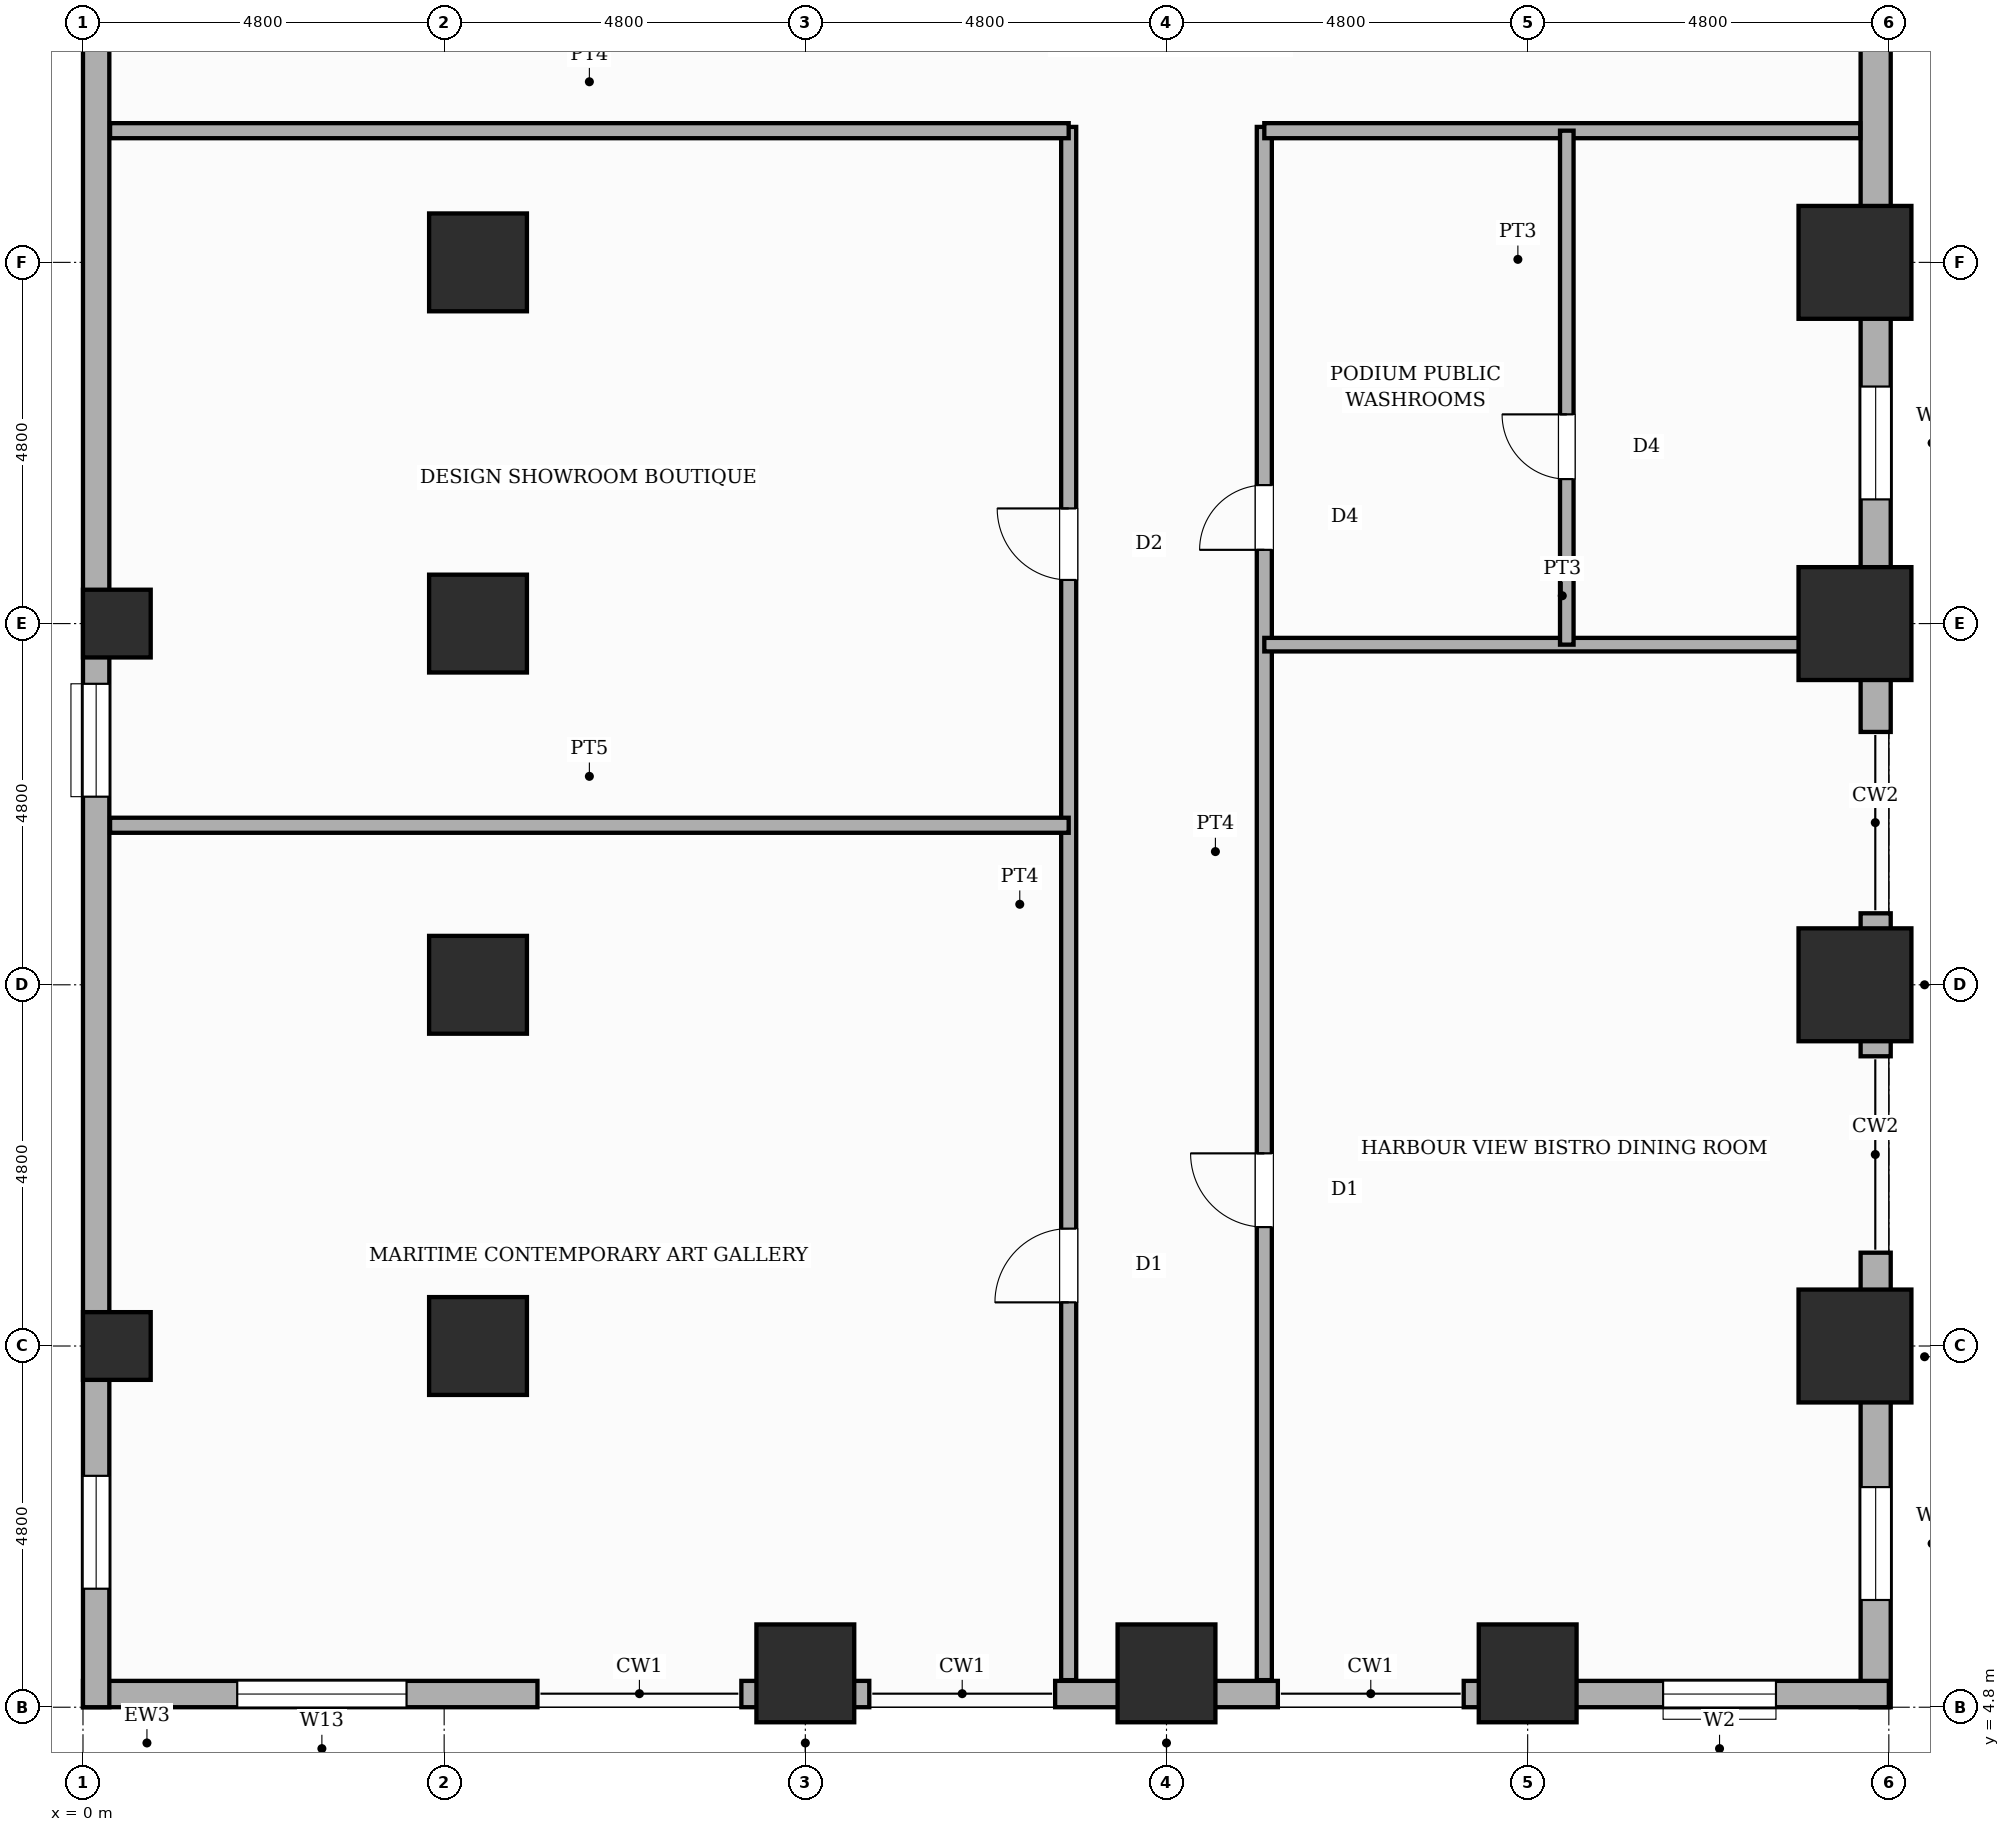
"""IFC4 building model, lengths in metres.
Left out: names, types, materials, properties, quantities, classifications, styles, units other than length and angle.
Written with IfcOpenShell. Run it as: python <this file> out.ifc"""

import sys

from ifc_helpers import new_model, si_unit, direction, frame, frame_2d, origin, origin_2d, place, context, subcontext, project, spatial, rectangle, circle, extrude, element, fill, save


model = new_model("IFC4")
c1 = context("Model", 3, precision=1e-05, world=origin(), true_north=direction((0.0, 1.0)))
c2 = subcontext(c1, "Body", "Model", "MODEL_VIEW")
j1 = project(units=[si_unit("LENGTHUNIT", "METRE"), si_unit("PLANEANGLEUNIT", "RADIAN")], contexts=[c1])
p1 = place(None, origin())
s1 = spatial("IfcSite", under=j1, at=p1, CompositionType="ELEMENT")
p2 = place(p1, origin())
s2 = spatial("IfcBuilding", under=s1, at=p2, CompositionType="ELEMENT")
p3 = place(p2, frame((0.0, 0.0, 10.0)))
s3 = spatial("IfcBuildingStorey", under=s2, at=p3, CompositionType="ELEMENT", Elevation=10.0)
for number, where, z_axis, x_axis in (
    (1, (0.45, 9.6, 0.0), (0.0, 0.0, 1.0), (1.0, 0.0, 0.0)),
    (2, (0.45, 19.2, 0.0), (0.0, 0.0, 1.0), (1.0, 0.0, 0.0)),
):
    element("IfcColumn", number, at=place(p3, frame(where, z_axis=z_axis, x_axis=x_axis)), inside=s3, PredefinedType="COLUMN", context=c2, shape_type="SweptSolid", body=[
        extrude(circle(Radius=0.45, at=origin_2d()), origin(), (0.0, 0.0, 1.0), 4.8),
    ])
for number, where, z_axis, x_axis in (
    (3, (5.25, 9.6, 0.0), (0.0, 0.0, 1.0), (1.0, 0.0, 0.0)),
    (4, (5.25, 14.4, 0.0), (0.0, 0.0, 1.0), (1.0, 0.0, 0.0)),
    (5, (5.25, 19.2, 0.0), (0.0, 0.0, 1.0), (1.0, 0.0, 0.0)),
    (6, (5.25, 24.0, 0.0), (0.0, 0.0, 1.0), (1.0, 0.0, 0.0)),
    (7, (9.6, 5.25, 0.0), (0.0, 0.0, 1.0), (1.0, 0.0, 0.0)),
    (8, (14.4, 5.25, 0.0), (0.0, 0.0, 1.0), (1.0, 0.0, 0.0)),
    (9, (19.2, 5.25, 0.0), (0.0, 0.0, 1.0), (1.0, 0.0, 0.0)),
):
    element("IfcColumn", number, at=place(p3, frame(where, z_axis=z_axis, x_axis=x_axis)), inside=s3, PredefinedType="COLUMN", context=c2, shape_type="SweptSolid", body=[
        extrude(rectangle(XDim=1.3, YDim=1.3, at=origin_2d()), origin(), (0.0, 0.0, 1.0), 4.8),
    ])
for number, where, z_axis, x_axis in (
    (10, (23.55, 9.6, 0.0), (0.0, 0.0, 1.0), (1.0, 0.0, 0.0)),
    (11, (23.55, 14.4, 0.0), (0.0, 0.0, 1.0), (1.0, 0.0, 0.0)),
    (12, (23.55, 19.2, 0.0), (0.0, 0.0, 1.0), (1.0, 0.0, 0.0)),
    (13, (23.55, 24.0, 0.0), (0.0, 0.0, 1.0), (1.0, 0.0, 0.0)),
):
    element("IfcColumn", number, at=place(p3, frame(where, z_axis=z_axis, x_axis=x_axis)), inside=s3, PredefinedType="USERDEFINED", context=c2, shape_type="SweptSolid", body=[
        extrude(rectangle(XDim=1.5, YDim=1.5, at=origin_2d()), origin(), (0.0, 0.0, 1.0), 4.8),
    ])
p4 = place(p3, frame((23.825, 48.0, 0.0), z_axis=(0.0, 0.0, 1.0), x_axis=(0.0, -1.0, 0.0)))
e14 = element("IfcWall", 14, at=p4, inside=s3, PredefinedType="SOLIDWALL", context=c2, shape_type="SweptSolid", body=[
    extrude(rectangle(XDim=30.24, YDim=0.4, at=frame_2d((15.12, 0.0))), origin(), (0.0, 0.0, 1.0), 3.48),
])
p5 = place(p4, frame((25.65, 0.0, 0.85)))
e15 = element("IfcOpeningElement", 15, at=p5, cuts=e14, PredefinedType="OPENING", context=c2, shape_type="SweptSolid", body=[
    extrude(rectangle(XDim=1.5, YDim=2.1, at=frame_2d((0.75, 1.05))), frame((0.0, 0.21, 0.0), z_axis=(0.0, -1.0, 0.0), x_axis=(1.0, 0.0, 0.0)), (0.0, 0.0, 1.0), 0.42),
])
p6 = place(p3, frame((23.825, 15.35, 0.0), z_axis=(0.0, 0.0, 1.0), x_axis=(0.0, -1.0, 0.0)))
e16 = element("IfcWall", 16, at=p6, inside=s3, PredefinedType="SOLIDWALL", context=c2, shape_type="SweptSolid", body=[
    extrude(rectangle(XDim=1.9, YDim=0.4, at=frame_2d((0.95, 0.0))), origin(), (0.0, 0.0, 1.0), 3.48),
])
p7 = place(p3, frame((23.825, 10.84, 0.0), z_axis=(0.0, 0.0, 1.0), x_axis=(0.0, -1.0, 0.0)))
e17 = element("IfcWall", 17, at=p7, inside=s3, PredefinedType="SOLIDWALL", context=c2, shape_type="SweptSolid", body=[
    extrude(rectangle(XDim=6.04, YDim=0.4, at=frame_2d((3.02, 0.0))), origin(), (0.0, 0.0, 1.0), 3.48),
])
p8 = place(p7, frame((3.115, 0.0, 0.85)))
e18 = element("IfcOpeningElement", 18, at=p8, cuts=e17, PredefinedType="OPENING", context=c2, shape_type="SweptSolid", body=[
    extrude(rectangle(XDim=1.5, YDim=2.1, at=frame_2d((0.75, 1.05))), frame((0.0, 0.21, 0.0), z_axis=(0.0, -1.0, 0.0), x_axis=(1.0, 0.0, 0.0)), (0.0, 0.0, 1.0), 0.42),
])
p9 = place(p3, frame((24.0, 4.975, 0.0), z_axis=(0.0, 0.0, 1.0), x_axis=(-1.0, 0.0, 0.0)))
e19 = element("IfcWall", 19, at=p9, inside=s3, PredefinedType="STANDARD", context=c2, shape_type="SweptSolid", body=[
    extrude(rectangle(XDim=5.65, YDim=0.35, at=frame_2d((2.825, 0.0))), origin(), (0.0, 0.0, 1.0), 3.48),
])
p10 = place(p9, frame((1.5, 0.0, 0.85)))
e20 = element("IfcOpeningElement", 20, at=p10, cuts=e19, PredefinedType="OPENING", context=c2, shape_type="SweptSolid", body=[
    extrude(rectangle(XDim=1.5, YDim=2.1, at=frame_2d((0.75, 1.05))), frame((0.0, 0.185, 0.0), z_axis=(0.0, -1.0, 0.0), x_axis=(1.0, 0.0, 0.0)), (0.0, 0.0, 1.0), 0.37),
])
p11 = place(p3, frame((15.88, 4.975, 0.0), z_axis=(0.0, 0.0, 1.0), x_axis=(-1.0, 0.0, 0.0)))
e21 = element("IfcWall", 21, at=p11, inside=s3, PredefinedType="STANDARD", context=c2, shape_type="SweptSolid", body=[
    extrude(rectangle(XDim=2.96, YDim=0.35, at=frame_2d((1.48, 0.0))), origin(), (0.0, 0.0, 1.0), 3.48),
])
p12 = place(p3, frame((10.45, 4.975, 0.0), z_axis=(0.0, 0.0, 1.0), x_axis=(-1.0, 0.0, 0.0)))
e22 = element("IfcWall", 22, at=p12, inside=s3, PredefinedType="STANDARD", context=c2, shape_type="SweptSolid", body=[
    extrude(rectangle(XDim=1.7, YDim=0.35, at=frame_2d((0.85, 0.0))), origin(), (0.0, 0.0, 1.0), 3.48),
])
p13 = place(p3, frame((6.04, 4.975, 0.0), z_axis=(0.0, 0.0, 1.0), x_axis=(-1.0, 0.0, 0.0)))
e23 = element("IfcWall", 23, at=p13, inside=s3, PredefinedType="STANDARD", context=c2, shape_type="SweptSolid", body=[
    extrude(rectangle(XDim=6.04, YDim=0.35, at=frame_2d((3.02, 0.0))), origin(), (0.0, 0.0, 1.0), 4.4),
])
p14 = place(p13, frame((1.74, 0.0, 0.85)))
e24 = element("IfcOpeningElement", 24, at=p14, cuts=e23, PredefinedType="OPENING", context=c2, shape_type="SweptSolid", body=[
    extrude(rectangle(XDim=2.25, YDim=2.85, at=frame_2d((1.125, 1.425))), frame((0.0, 0.185, 0.0), z_axis=(0.0, -1.0, 0.0), x_axis=(1.0, 0.0, 0.0)), (0.0, 0.0, 1.0), 0.37),
])
p15 = place(p3, frame((0.175, 4.8, 0.0), z_axis=(0.0, 0.0, 1.0), x_axis=(0.0, 1.0, 0.0)))
e25 = element("IfcWall", 25, at=p15, inside=s3, PredefinedType="STANDARD", context=c2, shape_type="SweptSolid", body=[
    extrude(rectangle(XDim=43.2, YDim=0.35, at=frame_2d((21.6, 0.0))), origin(), (0.0, 0.0, 1.0), 3.48),
])
p16 = place(p15, frame((1.575, 0.0, 0.85)))
e26 = element("IfcOpeningElement", 26, at=p16, cuts=e25, PredefinedType="OPENING", context=c2, shape_type="SweptSolid", body=[
    extrude(rectangle(XDim=1.5, YDim=2.1, at=frame_2d((0.75, 1.05))), frame((0.0, 0.185, 0.0), z_axis=(0.0, -1.0, 0.0), x_axis=(1.0, 0.0, 0.0)), (0.0, 0.0, 1.0), 0.37),
])
p17 = place(p15, frame((12.1, 0.0, 0.85)))
e27 = element("IfcOpeningElement", 27, at=p17, cuts=e25, PredefinedType="OPENING", context=c2, shape_type="SweptSolid", body=[
    extrude(rectangle(XDim=1.5, YDim=2.1, at=frame_2d((0.75, 1.05))), frame((0.0, 0.185, 0.0), z_axis=(0.0, -1.0, 0.0), x_axis=(1.0, 0.0, 0.0)), (0.0, 0.0, 1.0), 0.37),
])
p18 = place(p3, frame((13.1, 5.16, 0.0), z_axis=(0.0, 0.0, 1.0), x_axis=(0.0, 1.0, 0.0)))
e28 = element("IfcWall", 28, at=p18, inside=s3, PredefinedType="PARTITIONING", context=c2, shape_type="SweptSolid", body=[
    extrude(rectangle(XDim=20.64, YDim=0.2, at=frame_2d((10.32, 0.0))), origin(), (0.0, 0.0, 1.0), 4.4),
])
p19 = place(p18, frame((5.02, 0.0, 0.0)))
e29 = element("IfcOpeningElement", 29, at=p19, cuts=e28, PredefinedType="OPENING", context=c2, shape_type="SweptSolid", body=[
    extrude(rectangle(XDim=0.98, YDim=2.18, at=frame_2d((0.49, 1.09))), frame((0.0, 0.11, 0.0), z_axis=(0.0, -1.0, 0.0), x_axis=(1.0, 0.0, 0.0)), (0.0, 0.0, 1.0), 0.22),
])
p20 = place(p18, frame((14.62, 0.0, 0.0)))
e30 = element("IfcOpeningElement", 30, at=p20, cuts=e28, PredefinedType="OPENING", context=c2, shape_type="SweptSolid", body=[
    extrude(rectangle(XDim=0.95, YDim=2.15, at=frame_2d((0.475, 1.075))), frame((0.0, 0.11, 0.0), z_axis=(0.0, -1.0, 0.0), x_axis=(1.0, 0.0, 0.0)), (0.0, 0.0, 1.0), 0.22),
])
p21 = place(p3, frame((15.7, 5.16, 0.0), z_axis=(0.0, 0.0, 1.0), x_axis=(0.0, 1.0, 0.0)))
e31 = element("IfcWall", 31, at=p21, inside=s3, PredefinedType="PARTITIONING", context=c2, shape_type="SweptSolid", body=[
    extrude(rectangle(XDim=20.64, YDim=0.2, at=frame_2d((10.32, 0.0))), origin(), (0.0, 0.0, 1.0), 4.4),
])
p22 = place(p21, frame((6.02, 0.0, 0.0)))
e32 = element("IfcOpeningElement", 32, at=p22, cuts=e31, PredefinedType="OPENING", context=c2, shape_type="SweptSolid", body=[
    extrude(rectangle(XDim=0.98, YDim=2.18, at=frame_2d((0.49, 1.09))), frame((0.0, 0.11, 0.0), z_axis=(0.0, -1.0, 0.0), x_axis=(1.0, 0.0, 0.0)), (0.0, 0.0, 1.0), 0.22),
])
p23 = place(p21, frame((15.02, 0.0, 0.0)))
e33 = element("IfcOpeningElement", 33, at=p23, cuts=e31, PredefinedType="OPENING", context=c2, shape_type="SweptSolid", body=[
    extrude(rectangle(XDim=0.86, YDim=2.1, at=frame_2d((0.43, 1.05))), frame((0.0, 0.11, 0.0), z_axis=(0.0, -1.0, 0.0), x_axis=(1.0, 0.0, 0.0)), (0.0, 0.0, 1.0), 0.22),
])
p24 = place(p3, frame((0.36, 25.75, 0.0), z_axis=(0.0, 0.0, 1.0), x_axis=(1.0, 0.0, 0.0)))
e34 = element("IfcWall", 34, at=p24, inside=s3, PredefinedType="PARTITIONING", context=c2, shape_type="SweptSolid", body=[
    extrude(rectangle(XDim=12.74, YDim=0.2, at=frame_2d((6.37, 0.0))), origin(), (0.0, 0.0, 1.0), 4.4),
])
p25 = place(p3, frame((15.7, 25.75, 0.0), z_axis=(0.0, 0.0, 1.0), x_axis=(1.0, 0.0, 0.0)))
e35 = element("IfcWall", 35, at=p25, inside=s3, PredefinedType="PARTITIONING", context=c2, shape_type="SweptSolid", body=[
    extrude(rectangle(XDim=7.92, YDim=0.2, at=frame_2d((3.96, 0.0))), origin(), (0.0, 0.0, 1.0), 4.4),
])
p26 = place(p3, frame((0.36, 16.52, 0.0), z_axis=(0.0, 0.0, 1.0), x_axis=(1.0, 0.0, 0.0)))
e36 = element("IfcWall", 36, at=p26, inside=s3, PredefinedType="SOLIDWALL", context=c2, shape_type="SweptSolid", body=[
    extrude(rectangle(XDim=12.74, YDim=0.2, at=frame_2d((6.37, 0.0))), origin(), (0.0, 0.0, 1.0), 4.4),
])
p27 = place(p3, frame((15.7, 18.92, 0.0), z_axis=(0.0, 0.0, 1.0), x_axis=(1.0, 0.0, 0.0)))
e37 = element("IfcWall", 37, at=p27, inside=s3, PredefinedType="PLUMBINGWALL", context=c2, shape_type="SweptSolid", body=[
    extrude(rectangle(XDim=7.92, YDim=0.18, at=frame_2d((3.96, 0.0))), origin(), (0.0, 0.0, 1.0), 3.48),
])
p28 = place(p3, frame((19.72, 18.92, 0.0), z_axis=(0.0, 0.0, 1.0), x_axis=(0.0, 1.0, 0.0)))
e38 = element("IfcWall", 38, at=p28, inside=s3, PredefinedType="PLUMBINGWALL", context=c2, shape_type="SweptSolid", body=[
    extrude(rectangle(XDim=6.83, YDim=0.18, at=frame_2d((3.415, 0.0))), origin(), (0.0, 0.0, 1.0), 4.4),
])
p29 = place(p28, frame((2.2, 0.0, 0.0)))
e39 = element("IfcOpeningElement", 39, at=p29, cuts=e38, PredefinedType="OPENING", context=c2, shape_type="SweptSolid", body=[
    extrude(rectangle(XDim=0.86, YDim=2.1, at=frame_2d((0.43, 1.05))), frame((0.0, 0.1, 0.0), z_axis=(0.0, -1.0, 0.0), x_axis=(1.0, 0.0, 0.0)), (0.0, 0.0, 1.0), 0.2),
])
p30 = place(p5, origin())
e40 = element("IfcWindow", 40, at=p30, inside=s3, PartitioningType="SINGLE_PANEL", PredefinedType="WINDOW", context=c2, shape_type="SweptSolid", body=[
    extrude(rectangle(XDim=1.5, YDim=2.1, at=frame_2d((0.75, 1.05))), frame((0.0, 0.03, 0.0), z_axis=(0.0, -1.0, 0.0), x_axis=(1.0, 0.0, 0.0)), (0.0, 0.0, 1.0), 0.06),
])
fill(e15, e40)
p31 = place(p8, origin())
e41 = element("IfcWindow", 41, at=p31, inside=s3, PartitioningType="SINGLE_PANEL", PredefinedType="WINDOW", context=c2, shape_type="SweptSolid", body=[
    extrude(rectangle(XDim=1.5, YDim=2.1, at=frame_2d((0.75, 1.05))), frame((0.0, 0.03, 0.0), z_axis=(0.0, -1.0, 0.0), x_axis=(1.0, 0.0, 0.0)), (0.0, 0.0, 1.0), 0.06),
])
fill(e18, e41)
p32 = place(p10, origin())
e42 = element("IfcWindow", 42, at=p32, inside=s3, PartitioningType="SINGLE_PANEL", PredefinedType="WINDOW", context=c2, shape_type="SweptSolid", body=[
    extrude(rectangle(XDim=1.5, YDim=2.1, at=frame_2d((0.75, 1.05))), frame((0.0, 0.03, 0.0), z_axis=(0.0, -1.0, 0.0), x_axis=(1.0, 0.0, 0.0)), (0.0, 0.0, 1.0), 0.06),
])
fill(e20, e42)
p33 = place(p14, origin())
e43 = element("IfcWindow", 43, at=p33, inside=s3, PartitioningType="SINGLE_PANEL", PredefinedType="WINDOW", context=c2, shape_type="SweptSolid", body=[
    extrude(rectangle(XDim=2.25, YDim=2.85, at=frame_2d((1.125, 1.425))), frame((0.0, 0.03, 0.0), z_axis=(0.0, -1.0, 0.0), x_axis=(1.0, 0.0, 0.0)), (0.0, 0.0, 1.0), 0.06),
])
fill(e24, e43)
p34 = place(p16, origin())
e44 = element("IfcWindow", 44, at=p34, inside=s3, PartitioningType="SINGLE_PANEL", PredefinedType="WINDOW", context=c2, shape_type="SweptSolid", body=[
    extrude(rectangle(XDim=1.5, YDim=2.1, at=frame_2d((0.75, 1.05))), frame((0.0, 0.03, 0.0), z_axis=(0.0, -1.0, 0.0), x_axis=(1.0, 0.0, 0.0)), (0.0, 0.0, 1.0), 0.06),
])
fill(e26, e44)
p35 = place(p17, origin())
e45 = element("IfcWindow", 45, at=p35, inside=s3, PartitioningType="SINGLE_PANEL", PredefinedType="WINDOW", context=c2, shape_type="SweptSolid", body=[
    extrude(rectangle(XDim=1.5, YDim=2.1, at=frame_2d((0.75, 1.05))), frame((0.0, 0.03, 0.0), z_axis=(0.0, -1.0, 0.0), x_axis=(1.0, 0.0, 0.0)), (0.0, 0.0, 1.0), 0.06),
])
fill(e27, e45)
p36 = place(p19, origin())
e46 = element("IfcDoor", 46, at=p36, inside=s3, OperationType="SINGLE_SWING_LEFT", PredefinedType="DOOR", context=c2, shape_type="SweptSolid", body=[
    extrude(rectangle(XDim=0.98, YDim=2.18, at=frame_2d((0.49, 1.09))), frame((0.0, 0.025, 0.0), z_axis=(0.0, -1.0, 0.0), x_axis=(1.0, 0.0, 0.0)), (0.0, 0.0, 1.0), 0.05),
])
fill(e29, e46)
p37 = place(p20, origin())
e47 = element("IfcDoor", 47, at=p37, inside=s3, OperationType="SINGLE_SWING_RIGHT", PredefinedType="DOOR", context=c2, shape_type="SweptSolid", body=[
    extrude(rectangle(XDim=0.95, YDim=2.15, at=frame_2d((0.475, 1.075))), frame((0.0, 0.025, 0.0), z_axis=(0.0, -1.0, 0.0), x_axis=(1.0, 0.0, 0.0)), (0.0, 0.0, 1.0), 0.05),
])
fill(e30, e47)
p38 = place(p22, origin())
e48 = element("IfcDoor", 48, at=p38, inside=s3, OperationType="SINGLE_SWING_RIGHT", PredefinedType="DOOR", context=c2, shape_type="SweptSolid", body=[
    extrude(rectangle(XDim=0.98, YDim=2.18, at=frame_2d((0.49, 1.09))), frame((0.0, 0.025, 0.0), z_axis=(0.0, -1.0, 0.0), x_axis=(1.0, 0.0, 0.0)), (0.0, 0.0, 1.0), 0.05),
])
fill(e32, e48)
p39 = place(p23, origin())
e49 = element("IfcDoor", 49, at=p39, inside=s3, OperationType="SINGLE_SWING_LEFT", PredefinedType="DOOR", context=c2, shape_type="SweptSolid", body=[
    extrude(rectangle(XDim=0.86, YDim=2.1, at=frame_2d((0.43, 1.05))), frame((0.0, 0.025, 0.0), z_axis=(0.0, -1.0, 0.0), x_axis=(1.0, 0.0, 0.0)), (0.0, 0.0, 1.0), 0.05),
])
fill(e33, e49)
p40 = place(p29, origin())
e50 = element("IfcDoor", 50, at=p40, inside=s3, OperationType="SINGLE_SWING_RIGHT", PredefinedType="DOOR", context=c2, shape_type="SweptSolid", body=[
    extrude(rectangle(XDim=0.86, YDim=2.1, at=frame_2d((0.43, 1.05))), frame((0.0, 0.025, 0.0), z_axis=(0.0, -1.0, 0.0), x_axis=(1.0, 0.0, 0.0)), (0.0, 0.0, 1.0), 0.05),
])
fill(e39, e50)
save(model, sys.argv[1])
